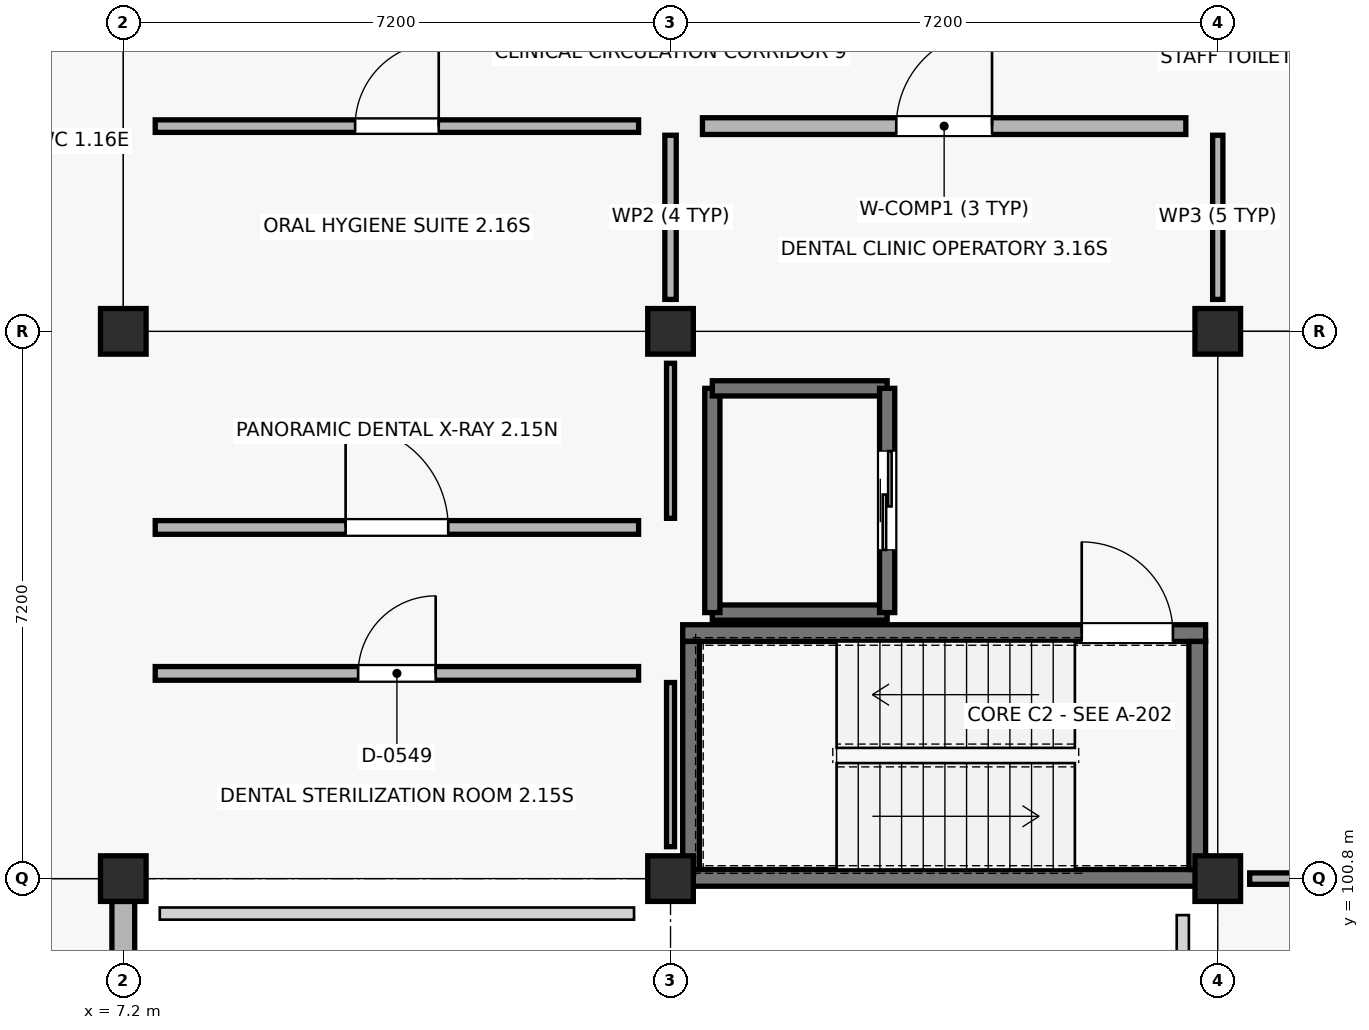
"""IFC4 building model, lengths in metres.
Left out: names, types, materials, properties, quantities, classifications, styles, units other than length and angle.
Written with IfcOpenShell. Run it as: python <this file> out.ifc"""

import sys

from ifc_helpers import new_model, si_unit, direction, frame, frame_2d, origin, origin_2d, place, context, subcontext, project, spatial, rectangle, extrude, element, fill, save


model = new_model("IFC4")
c1 = context("Model", 3, precision=1e-05, world=origin(), true_north=direction((0.0, 1.0)))
c2 = subcontext(c1, "Body", "Model", "MODEL_VIEW")
j1 = project(units=[si_unit("LENGTHUNIT", "METRE"), si_unit("PLANEANGLEUNIT", "RADIAN")], contexts=[c1])
p1 = place(None, origin())
s1 = spatial("IfcSite", under=j1, at=p1, CompositionType="ELEMENT")
p2 = place(p1, origin())
s2 = spatial("IfcBuilding", under=s1, at=p2, CompositionType="ELEMENT")
p3 = place(p2, frame((0.0, 0.0, 13.5)))
s3 = spatial("IfcBuildingStorey", under=s2, at=p3, CompositionType="ELEMENT", Elevation=13.5)
for number, where, z_axis, x_axis in (
    (1, (7.2, 100.8, 0.0), (0.0, 0.0, 1.0), (1.0, 0.0, 0.0)),
    (2, (7.2, 108.0, 0.0), (0.0, 0.0, 1.0), (1.0, 0.0, 0.0)),
    (3, (14.4, 100.8, 0.0), (0.0, 0.0, 1.0), (1.0, 0.0, 0.0)),
    (4, (14.4, 108.0, 0.0), (0.0, 0.0, 1.0), (1.0, 0.0, 0.0)),
    (5, (21.6, 100.8, 0.0), (0.0, 0.0, 1.0), (1.0, 0.0, 0.0)),
    (6, (21.6, 108.0, 0.0), (0.0, 0.0, 1.0), (1.0, 0.0, 0.0)),
):
    element("IfcColumn", number, at=place(p3, frame(where, z_axis=z_axis, x_axis=x_axis)), inside=s3, PredefinedType="COLUMN", context=c2, shape_type="SweptSolid", body=[
        extrude(rectangle(XDim=0.6, YDim=0.6, at=origin_2d()), origin(), (0.0, 0.0, 1.0), 4.05),
    ])
p4 = place(p3, frame((7.2, 93.9, 0.0), z_axis=(0.0, 0.0, 1.0), x_axis=(0.0, 1.0, 0.0)))
e7 = element("IfcWall", 7, at=p4, inside=s3, PredefinedType="STANDARD", context=c2, shape_type="SweptSolid", body=[
    extrude(rectangle(XDim=6.6, YDim=0.3, at=frame_2d((3.3, 0.0))), origin(), (0.0, 0.0, 1.0), 3.24),
])
p5 = place(p3, frame((14.56, 100.81, 0.0), z_axis=(0.0, 0.0, 1.0), x_axis=(1.0, 0.0, 0.0)))
e8 = element("IfcWall", 8, at=p5, inside=s3, PredefinedType="SHEAR", context=c2, shape_type="SweptSolid", body=[
    extrude(rectangle(XDim=6.88, YDim=0.22, at=frame_2d((3.44, 0.0))), origin(), (0.0, 0.0, 1.0), 3.79),
])
p6 = place(p3, frame((14.56, 104.03, 0.0), z_axis=(0.0, 0.0, 1.0), x_axis=(1.0, 0.0, 0.0)))
e9 = element("IfcWall", 9, at=p6, inside=s3, PredefinedType="SHEAR", context=c2, shape_type="SweptSolid", body=[
    extrude(rectangle(XDim=6.88, YDim=0.22, at=frame_2d((3.44, 0.0))), origin(), (0.0, 0.0, 1.0), 3.79),
])
p7 = place(p6, frame((5.25, 0.0, 0.0)))
e10 = element("IfcOpeningElement", 10, at=p7, cuts=e9, PredefinedType="OPENING", context=c2, shape_type="SweptSolid", body=[
    extrude(rectangle(XDim=1.2, YDim=2.15, at=frame_2d((0.6, 1.075))), frame((0.0, 0.12, 0.0), z_axis=(0.0, -1.0, 0.0), x_axis=(1.0, 0.0, 0.0)), (0.0, 0.0, 1.0), 0.24),
])
for number, where, z_axis, x_axis in (
    (11, (14.67, 100.92, 0.0), (0.0, 0.0, 1.0), (0.0, 1.0, 0.0)),
    (12, (21.33, 100.92, 0.0), (0.0, 0.0, 1.0), (0.0, 1.0, 0.0)),
):
    element("IfcWall", number, at=place(p3, frame(where, z_axis=z_axis, x_axis=x_axis)), inside=s3, PredefinedType="SHEAR", context=c2, shape_type="SweptSolid", body=[
        extrude(rectangle(XDim=3.0, YDim=0.22, at=frame_2d((1.5, 0.0))), origin(), (0.0, 0.0, 1.0), 3.79),
    ])
p8 = place(p3, frame((14.95, 104.3, 0.0), z_axis=(0.0, 0.0, 1.0), x_axis=(1.0, 0.0, 0.0)))
e13 = element("IfcWall", 13, at=p8, inside=s3, PredefinedType="SHEAR", context=c2, shape_type="SweptSolid", body=[
    extrude(rectangle(XDim=2.3, YDim=0.2, at=frame_2d((1.15, 0.0))), origin(), (0.0, 0.0, 1.0), 3.79),
])
p9 = place(p3, frame((14.95, 104.3, 0.0), z_axis=(0.0, 0.0, 1.0), x_axis=(0.0, 1.0, 0.0)))
e14 = element("IfcWall", 14, at=p9, inside=s3, PredefinedType="SHEAR", context=c2, shape_type="SweptSolid", body=[
    extrude(rectangle(XDim=2.95, YDim=0.2, at=frame_2d((1.475, 0.0))), origin(), (0.0, 0.0, 1.0), 3.79),
])
p10 = place(p3, frame((14.95, 107.25, 0.0), z_axis=(0.0, 0.0, 1.0), x_axis=(1.0, 0.0, 0.0)))
e15 = element("IfcWall", 15, at=p10, inside=s3, PredefinedType="SHEAR", context=c2, shape_type="SweptSolid", body=[
    extrude(rectangle(XDim=2.3, YDim=0.2, at=frame_2d((1.15, 0.0))), origin(), (0.0, 0.0, 1.0), 3.79),
])
p11 = place(p3, frame((17.25, 104.3, 0.0), z_axis=(0.0, 0.0, 1.0), x_axis=(0.0, 1.0, 0.0)))
e16 = element("IfcWall", 16, at=p11, inside=s3, PredefinedType="SHEAR", context=c2, shape_type="SweptSolid", body=[
    extrude(rectangle(XDim=2.95, YDim=0.2, at=frame_2d((1.475, 0.0))), origin(), (0.0, 0.0, 1.0), 3.79),
])
p12 = place(p11, frame((0.825, 0.0, 0.0)))
e17 = element("IfcOpeningElement", 17, at=p12, cuts=e16, PredefinedType="OPENING", context=c2, shape_type="SweptSolid", body=[
    extrude(rectangle(XDim=1.3, YDim=2.15, at=frame_2d((0.65, 1.075))), frame((0.0, 0.11, 0.0), z_axis=(0.0, -1.0, 0.0), x_axis=(1.0, 0.0, 0.0)), (0.0, 0.0, 1.0), 0.22),
])
p13 = place(p3, frame((7.62, 103.5, 0.0), z_axis=(0.0, 0.0, 1.0), x_axis=(1.0, 0.0, 0.0)))
e18 = element("IfcWall", 18, at=p13, inside=s3, PredefinedType="PARTITIONING", context=c2, shape_type="SweptSolid", body=[
    extrude(rectangle(XDim=6.36, YDim=0.18, at=frame_2d((3.18, 0.0))), origin(), (0.0, 0.0, 1.0), 2.93),
])
p14 = place(p13, frame((2.67, 0.0, 0.0)))
e19 = element("IfcOpeningElement", 19, at=p14, cuts=e18, PredefinedType="OPENING", context=c2, shape_type="SweptSolid", body=[
    extrude(rectangle(XDim=1.02, YDim=2.19, at=frame_2d((0.51, 1.095))), frame((0.0, 0.1, 0.0), z_axis=(0.0, -1.0, 0.0), x_axis=(1.0, 0.0, 0.0)), (0.0, 0.0, 1.0), 0.2),
])
p15 = place(p3, frame((14.4, 101.22, 0.0), z_axis=(0.0, 0.0, 1.0), x_axis=(0.0, 1.0, 0.0)))
e20 = element("IfcWall", 20, at=p15, inside=s3, PredefinedType="PARTITIONING", context=c2, shape_type="SweptSolid", body=[
    extrude(rectangle(XDim=2.16, YDim=0.105, at=frame_2d((1.08, 0.0))), origin(), (0.0, 0.0, 1.0), 2.93),
])
p16 = place(p3, frame((7.62, 105.42, 0.0), z_axis=(0.0, 0.0, 1.0), x_axis=(1.0, 0.0, 0.0)))
e21 = element("IfcWall", 21, at=p16, inside=s3, PredefinedType="PARTITIONING", context=c2, shape_type="SweptSolid", body=[
    extrude(rectangle(XDim=6.36, YDim=0.18, at=frame_2d((3.18, 0.0))), origin(), (0.0, 0.0, 1.0), 2.93),
])
p17 = place(p16, frame((2.505, 0.0, 0.0)))
e22 = element("IfcOpeningElement", 22, at=p17, cuts=e21, PredefinedType="OPENING", context=c2, shape_type="SweptSolid", body=[
    extrude(rectangle(XDim=1.35, YDim=2.2, at=frame_2d((0.675, 1.1))), frame((0.0, 0.1, 0.0), z_axis=(0.0, -1.0, 0.0), x_axis=(1.0, 0.0, 0.0)), (0.0, 0.0, 1.0), 0.2),
])
p18 = place(p3, frame((14.4, 105.54, 0.0), z_axis=(0.0, 0.0, 1.0), x_axis=(0.0, 1.0, 0.0)))
e23 = element("IfcWall", 23, at=p18, inside=s3, PredefinedType="PARTITIONING", context=c2, shape_type="SweptSolid", body=[
    extrude(rectangle(XDim=2.04, YDim=0.105, at=frame_2d((1.02, 0.0))), origin(), (0.0, 0.0, 1.0), 2.93),
])
p19 = place(p3, frame((7.62, 110.7, 0.0), z_axis=(0.0, 0.0, 1.0), x_axis=(1.0, 0.0, 0.0)))
e24 = element("IfcWall", 24, at=p19, inside=s3, PredefinedType="PARTITIONING", context=c2, shape_type="SweptSolid", body=[
    extrude(rectangle(XDim=6.36, YDim=0.165, at=frame_2d((3.18, 0.0))), origin(), (0.0, 0.0, 1.0), 2.93),
])
p20 = place(p19, frame((2.63, 0.0, 0.0)))
e25 = element("IfcOpeningElement", 25, at=p20, cuts=e24, PredefinedType="OPENING", context=c2, shape_type="SweptSolid", body=[
    extrude(rectangle(XDim=1.1, YDim=2.19, at=frame_2d((0.55, 1.095))), frame((0.0, 0.093, 0.0), z_axis=(0.0, -1.0, 0.0), x_axis=(1.0, 0.0, 0.0)), (0.0, 0.0, 1.0), 0.185),
])
p21 = place(p3, frame((14.4, 108.42, 0.0), z_axis=(0.0, 0.0, 1.0), x_axis=(0.0, 1.0, 0.0)))
e26 = element("IfcWall", 26, at=p21, inside=s3, PredefinedType="PARTITIONING", context=c2, shape_type="SweptSolid", body=[
    extrude(rectangle(XDim=2.16, YDim=0.15, at=frame_2d((1.08, 0.0))), origin(), (0.0, 0.0, 1.0), 2.93),
])
p22 = place(p3, frame((14.82, 110.7, 0.0), z_axis=(0.0, 0.0, 1.0), x_axis=(1.0, 0.0, 0.0)))
e27 = element("IfcWall", 27, at=p22, inside=s3, PredefinedType="SOLIDWALL", context=c2, shape_type="SweptSolid", body=[
    extrude(rectangle(XDim=6.36, YDim=0.22, at=frame_2d((3.18, 0.0))), origin(), (0.0, 0.0, 1.0), 2.93),
])
p23 = place(p22, frame((2.55, 0.0, 0.0)))
e28 = element("IfcOpeningElement", 28, at=p23, cuts=e27, PredefinedType="OPENING", context=c2, shape_type="SweptSolid", body=[
    extrude(rectangle(XDim=1.26, YDim=2.19, at=frame_2d((0.63, 1.095))), frame((0.0, 0.12, 0.0), z_axis=(0.0, -1.0, 0.0), x_axis=(1.0, 0.0, 0.0)), (0.0, 0.0, 1.0), 0.24),
])
p24 = place(p3, frame((21.6, 108.42, 0.0), z_axis=(0.0, 0.0, 1.0), x_axis=(0.0, 1.0, 0.0)))
e29 = element("IfcWall", 29, at=p24, inside=s3, PredefinedType="PARTITIONING", context=c2, shape_type="SweptSolid", body=[
    extrude(rectangle(XDim=2.16, YDim=0.135, at=frame_2d((1.08, 0.0))), origin(), (0.0, 0.0, 1.0), 2.93),
])
p25 = place(p3, frame((22.02, 100.8, 0.0), z_axis=(0.0, 0.0, 1.0), x_axis=(1.0, 0.0, 0.0)))
e30 = element("IfcWall", 30, at=p25, inside=s3, PredefinedType="PARTITIONING", context=c2, shape_type="SweptSolid", body=[
    extrude(rectangle(XDim=2.16, YDim=0.15, at=frame_2d((1.08, 0.0))), origin(), (0.0, 0.0, 1.0), 2.93),
])
p26 = place(p7, origin())
e31 = element("IfcDoor", 31, at=p26, inside=s3, OperationType="SINGLE_SWING_LEFT", PredefinedType="DOOR", context=c2, shape_type="SweptSolid", body=[
    extrude(rectangle(XDim=1.2, YDim=2.15, at=frame_2d((0.6, 1.075))), frame((0.0, 0.025, 0.0), z_axis=(0.0, -1.0, 0.0), x_axis=(1.0, 0.0, 0.0)), (0.0, 0.0, 1.0), 0.05),
])
fill(e10, e31)
p27 = place(p12, origin())
e32 = element("IfcDoor", 32, at=p27, inside=s3, OperationType="SLIDING_TO_LEFT", PredefinedType="DOOR", context=c2, shape_type="SweptSolid", body=[
    extrude(rectangle(XDim=1.3, YDim=2.15, at=frame_2d((0.65, 1.075))), frame((0.0, 0.025, 0.0), z_axis=(0.0, -1.0, 0.0), x_axis=(1.0, 0.0, 0.0)), (0.0, 0.0, 1.0), 0.05),
])
fill(e17, e32)
p28 = place(p14, origin())
e33 = element("IfcDoor", 33, at=p28, inside=s3, OperationType="SINGLE_SWING_RIGHT", PredefinedType="DOOR", context=c2, shape_type="SweptSolid", body=[
    extrude(rectangle(XDim=1.02, YDim=2.19, at=frame_2d((0.51, 1.095))), frame((0.0, 0.025, 0.0), z_axis=(0.0, -1.0, 0.0), x_axis=(1.0, 0.0, 0.0)), (0.0, 0.0, 1.0), 0.05),
])
fill(e19, e33)
p29 = place(p17, origin())
e34 = element("IfcDoor", 34, at=p29, inside=s3, OperationType="SINGLE_SWING_LEFT", PredefinedType="DOOR", context=c2, shape_type="SweptSolid", body=[
    extrude(rectangle(XDim=1.35, YDim=2.2, at=frame_2d((0.675, 1.1))), frame((0.0, 0.025, 0.0), z_axis=(0.0, -1.0, 0.0), x_axis=(1.0, 0.0, 0.0)), (0.0, 0.0, 1.0), 0.05),
])
fill(e22, e34)
p30 = place(p20, origin())
e35 = element("IfcDoor", 35, at=p30, inside=s3, OperationType="SINGLE_SWING_RIGHT", PredefinedType="DOOR", context=c2, shape_type="SweptSolid", body=[
    extrude(rectangle(XDim=1.1, YDim=2.19, at=frame_2d((0.55, 1.095))), frame((0.0, 0.025, 0.0), z_axis=(0.0, -1.0, 0.0), x_axis=(1.0, 0.0, 0.0)), (0.0, 0.0, 1.0), 0.05),
])
fill(e25, e35)
p31 = place(p23, origin())
e36 = element("IfcDoor", 36, at=p31, inside=s3, OperationType="SINGLE_SWING_RIGHT", PredefinedType="DOOR", context=c2, shape_type="SweptSolid", body=[
    extrude(rectangle(XDim=1.26, YDim=2.19, at=frame_2d((0.63, 1.095))), frame((0.0, 0.025, 0.0), z_axis=(0.0, -1.0, 0.0), x_axis=(1.0, 0.0, 0.0)), (0.0, 0.0, 1.0), 0.05),
])
fill(e28, e36)
save(model, sys.argv[1])
